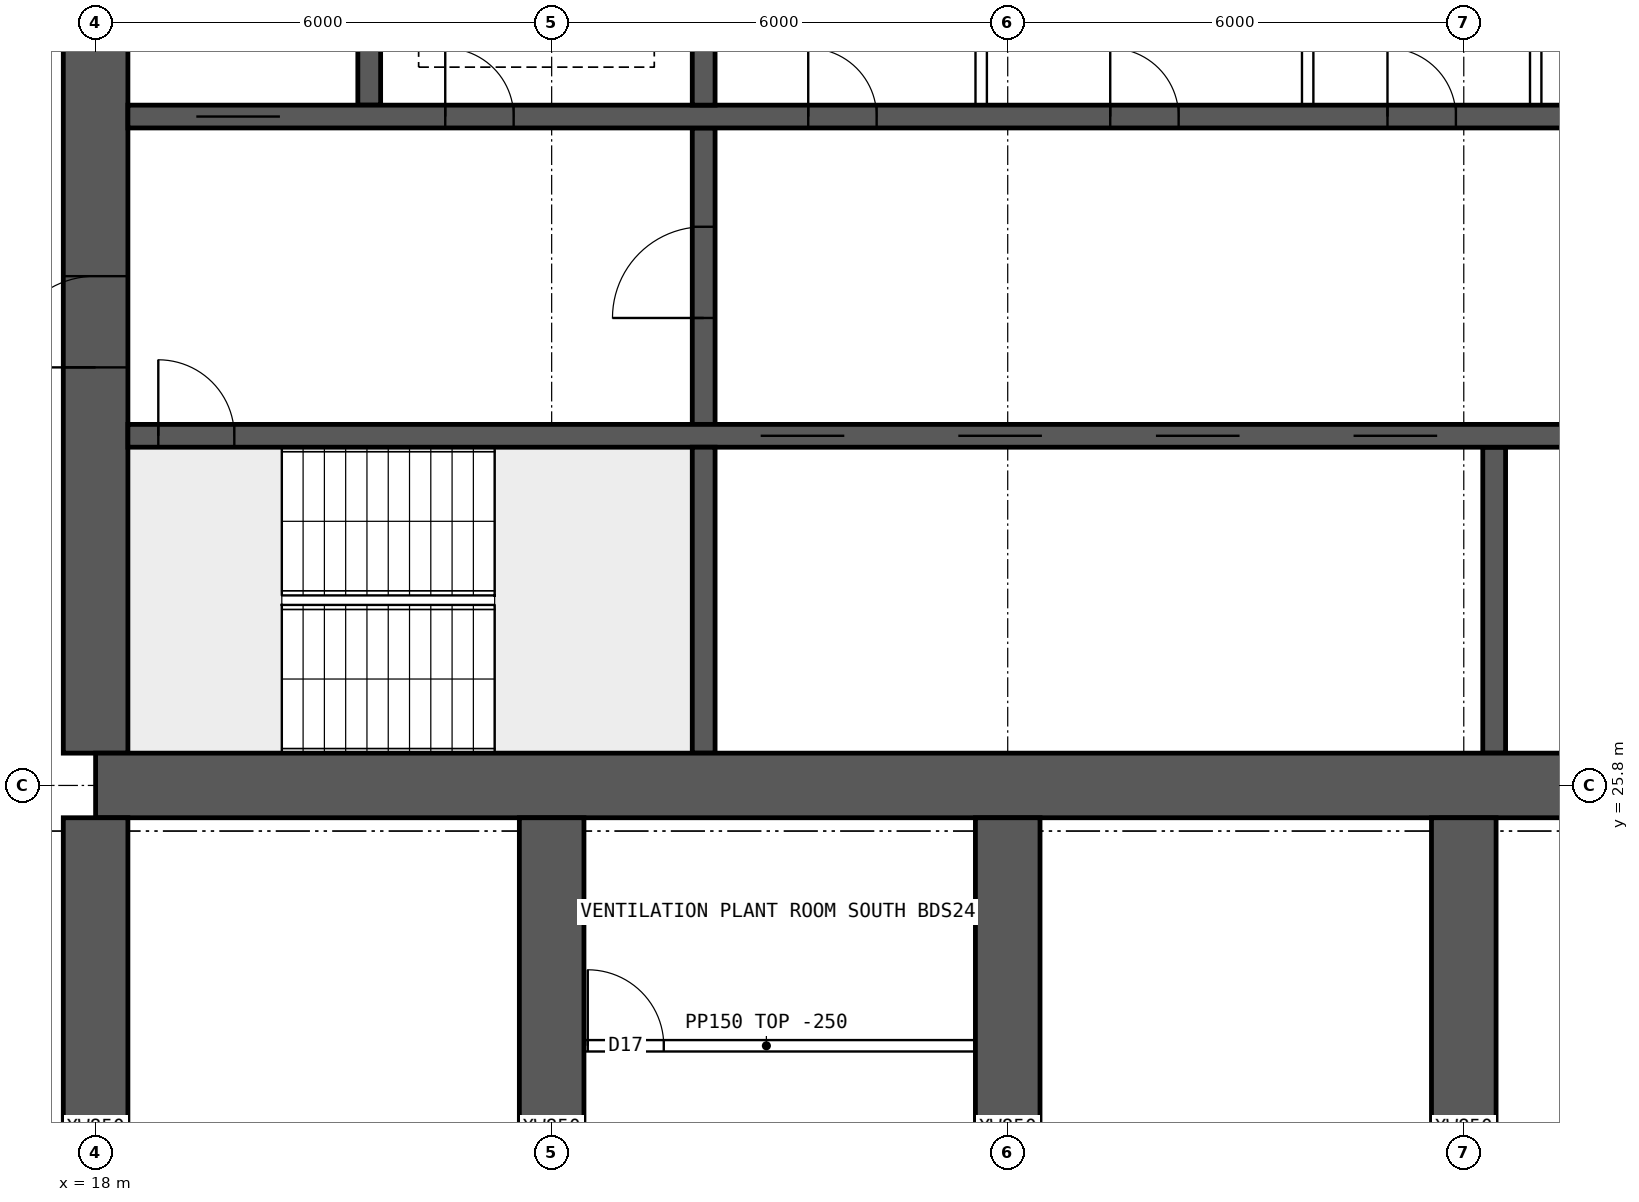
"""IFC4 building model, lengths in metres.
Left out: names, types, materials, properties, quantities, classifications, styles, units other than length and angle.
Written with IfcOpenShell. Run it as: python <this file> out.ifc"""

import sys

from ifc_helpers import new_model, si_unit, direction, frame, frame_2d, origin, place, context, subcontext, project, spatial, rectangle, extrude, element, fill, save


model = new_model("IFC4")
c1 = context("Model", 3, precision=1e-05, world=origin(), true_north=direction((0.0, 1.0)))
c2 = subcontext(c1, "Body", "Model", "MODEL_VIEW")
j1 = project(units=[si_unit("LENGTHUNIT", "METRE"), si_unit("PLANEANGLEUNIT", "RADIAN")], contexts=[c1])
p1 = place(None, origin())
s1 = spatial("IfcSite", under=j1, at=p1, CompositionType="ELEMENT")
p2 = place(p1, origin())
s2 = spatial("IfcBuilding", under=s1, at=p2, CompositionType="ELEMENT")
p3 = place(p2, frame((0.0, 0.0, 182.35)))
s3 = spatial("IfcBuildingStorey", under=s2, at=p3, CompositionType="ELEMENT", Elevation=182.35)
p4 = place(p3, frame((18.0, 25.8, 0.0), z_axis=(0.0, 0.0, 1.0), x_axis=(1.0, 0.0, 0.0)))
e1 = element("IfcWall", 1, at=p4, inside=s3, PredefinedType="SHEAR", context=c2, shape_type="SweptSolid", body=[
    extrude(rectangle(XDim=48.0, YDim=0.85, at=frame_2d((24.0, 0.0))), origin(), (0.0, 0.0, 1.0), 3.75),
])
p5 = place(p3, frame((18.0, 26.225, 0.0), z_axis=(0.0, 0.0, 1.0), x_axis=(0.0, 1.0, 0.0)))
e2 = element("IfcWall", 2, at=p5, inside=s3, PredefinedType="SHEAR", context=c2, shape_type="SweptSolid", body=[
    extrude(rectangle(XDim=11.55, YDim=0.85, at=frame_2d((5.775, 0.0))), origin(), (0.0, 0.0, 1.0), 3.75),
])
p6 = place(p5, frame((5.075, 0.0, 0.0)))
e3 = element("IfcOpeningElement", 3, at=p6, cuts=e2, PredefinedType="OPENING", context=c2, shape_type="SweptSolid", body=[
    extrude(rectangle(XDim=1.2, YDim=2.1, at=frame_2d((0.6, 1.05))), frame((0.0, 0.435, 0.0), z_axis=(0.0, -1.0, 0.0), x_axis=(1.0, 0.0, 0.0)), (0.0, 0.0, 1.0), 0.87),
])
p7 = place(p3, frame((18.425, 30.4, 0.0), z_axis=(0.0, 0.0, 1.0), x_axis=(1.0, 0.0, 0.0)))
e4 = element("IfcWall", 4, at=p7, inside=s3, PredefinedType="SHEAR", context=c2, shape_type="SweptSolid", body=[
    extrude(rectangle(XDim=47.15, YDim=0.3, at=frame_2d((23.575, 0.0))), origin(), (0.0, 0.0, 1.0), 3.75),
])
p8 = place(p7, frame((0.4, 0.0, 0.0)))
e5 = element("IfcOpeningElement", 5, at=p8, cuts=e4, PredefinedType="OPENING", context=c2, shape_type="SweptSolid", body=[
    extrude(rectangle(XDim=1.0, YDim=2.1, at=frame_2d((0.5, 1.05))), frame((0.0, 0.16, 0.0), z_axis=(0.0, -1.0, 0.0), x_axis=(1.0, 0.0, 0.0)), (0.0, 0.0, 1.0), 0.32),
])
p9 = place(p7, frame((45.75, 0.0, 0.0)))
e6 = element("IfcOpeningElement", 6, at=p9, cuts=e4, PredefinedType="OPENING", context=c2, shape_type="SweptSolid", body=[
    extrude(rectangle(XDim=1.0, YDim=2.1, at=frame_2d((0.5, 1.05))), frame((0.0, 0.16, 0.0), z_axis=(0.0, -1.0, 0.0), x_axis=(1.0, 0.0, 0.0)), (0.0, 0.0, 1.0), 0.32),
])
p10 = place(p7, frame((8.325, 0.0, 0.0)))
e7 = element("IfcOpeningElement", 7, at=p10, cuts=e4, PredefinedType="OPENING", context=c2, shape_type="SweptSolid", body=[
    extrude(rectangle(XDim=1.1, YDim=2.1, at=frame_2d((0.55, 1.05))), frame((0.0, 0.16, 0.0), z_axis=(0.0, -1.0, 0.0), x_axis=(1.0, 0.0, 0.0)), (0.0, 0.0, 1.0), 0.32),
])
p11 = place(p7, frame((10.925, 0.0, 0.0)))
e8 = element("IfcOpeningElement", 8, at=p11, cuts=e4, PredefinedType="OPENING", context=c2, shape_type="SweptSolid", body=[
    extrude(rectangle(XDim=1.1, YDim=2.1, at=frame_2d((0.55, 1.05))), frame((0.0, 0.16, 0.0), z_axis=(0.0, -1.0, 0.0), x_axis=(1.0, 0.0, 0.0)), (0.0, 0.0, 1.0), 0.32),
])
p12 = place(p7, frame((13.525, 0.0, 0.0)))
e9 = element("IfcOpeningElement", 9, at=p12, cuts=e4, PredefinedType="OPENING", context=c2, shape_type="SweptSolid", body=[
    extrude(rectangle(XDim=1.1, YDim=2.1, at=frame_2d((0.55, 1.05))), frame((0.0, 0.16, 0.0), z_axis=(0.0, -1.0, 0.0), x_axis=(1.0, 0.0, 0.0)), (0.0, 0.0, 1.0), 0.32),
])
p13 = place(p7, frame((16.125, 0.0, 0.0)))
e10 = element("IfcOpeningElement", 10, at=p13, cuts=e4, PredefinedType="OPENING", context=c2, shape_type="SweptSolid", body=[
    extrude(rectangle(XDim=1.1, YDim=2.1, at=frame_2d((0.55, 1.05))), frame((0.0, 0.16, 0.0), z_axis=(0.0, -1.0, 0.0), x_axis=(1.0, 0.0, 0.0)), (0.0, 0.0, 1.0), 0.32),
])
p14 = place(p7, frame((18.9, 0.0, 0.0)))
e11 = element("IfcOpeningElement", 11, at=p14, cuts=e4, PredefinedType="OPENING", context=c2, shape_type="SweptSolid", body=[
    extrude(rectangle(XDim=0.9, YDim=2.1, at=frame_2d((0.45, 1.05))), frame((0.0, 0.16, 0.0), z_axis=(0.0, -1.0, 0.0), x_axis=(1.0, 0.0, 0.0)), (0.0, 0.0, 1.0), 0.32),
])
p15 = place(p7, frame((30.192, 0.0, 0.0)))
e12 = element("IfcOpeningElement", 12, at=p15, cuts=e4, PredefinedType="OPENING", context=c2, shape_type="SweptSolid", body=[
    extrude(rectangle(XDim=1.1, YDim=2.1, at=frame_2d((0.55, 1.05))), frame((0.0, 0.16, 0.0), z_axis=(0.0, -1.0, 0.0), x_axis=(1.0, 0.0, 0.0)), (0.0, 0.0, 1.0), 0.32),
])
p16 = place(p7, frame((33.725, 0.0, 0.0)))
e13 = element("IfcOpeningElement", 13, at=p16, cuts=e4, PredefinedType="OPENING", context=c2, shape_type="SweptSolid", body=[
    extrude(rectangle(XDim=1.1, YDim=2.1, at=frame_2d((0.55, 1.05))), frame((0.0, 0.16, 0.0), z_axis=(0.0, -1.0, 0.0), x_axis=(1.0, 0.0, 0.0)), (0.0, 0.0, 1.0), 0.32),
])
p17 = place(p7, frame((37.258, 0.0, 0.0)))
e14 = element("IfcOpeningElement", 14, at=p17, cuts=e4, PredefinedType="OPENING", context=c2, shape_type="SweptSolid", body=[
    extrude(rectangle(XDim=1.1, YDim=2.1, at=frame_2d((0.55, 1.05))), frame((0.0, 0.16, 0.0), z_axis=(0.0, -1.0, 0.0), x_axis=(1.0, 0.0, 0.0)), (0.0, 0.0, 1.0), 0.32),
])
p18 = place(p3, frame((18.425, 34.6, 0.0), z_axis=(0.0, 0.0, 1.0), x_axis=(1.0, 0.0, 0.0)))
e15 = element("IfcWall", 15, at=p18, inside=s3, PredefinedType="SHEAR", context=c2, shape_type="SweptSolid", body=[
    extrude(rectangle(XDim=47.15, YDim=0.3, at=frame_2d((23.575, 0.0))), origin(), (0.0, 0.0, 1.0), 3.75),
])
p19 = place(p18, frame((0.9, 0.0, 0.0)))
e16 = element("IfcOpeningElement", 16, at=p19, cuts=e15, PredefinedType="OPENING", context=c2, shape_type="SweptSolid", body=[
    extrude(rectangle(XDim=1.1, YDim=2.1, at=frame_2d((0.55, 1.05))), frame((0.0, 0.16, 0.0), z_axis=(0.0, -1.0, 0.0), x_axis=(1.0, 0.0, 0.0)), (0.0, 0.0, 1.0), 0.32),
])
p20 = place(p18, frame((45.15, 0.0, 0.0)))
e17 = element("IfcOpeningElement", 17, at=p20, cuts=e15, PredefinedType="OPENING", context=c2, shape_type="SweptSolid", body=[
    extrude(rectangle(XDim=1.1, YDim=2.1, at=frame_2d((0.55, 1.05))), frame((0.0, 0.16, 0.0), z_axis=(0.0, -1.0, 0.0), x_axis=(1.0, 0.0, 0.0)), (0.0, 0.0, 1.0), 0.32),
])
p21 = place(p18, frame((4.175, 0.0, 0.0)))
e18 = element("IfcOpeningElement", 18, at=p21, cuts=e15, PredefinedType="OPENING", context=c2, shape_type="SweptSolid", body=[
    extrude(rectangle(XDim=0.9, YDim=2.1, at=frame_2d((0.45, 1.05))), frame((0.0, 0.16, 0.0), z_axis=(0.0, -1.0, 0.0), x_axis=(1.0, 0.0, 0.0)), (0.0, 0.0, 1.0), 0.32),
])
p22 = place(p18, frame((42.075, 0.0, 0.0)))
e19 = element("IfcOpeningElement", 19, at=p22, cuts=e15, PredefinedType="OPENING", context=c2, shape_type="SweptSolid", body=[
    extrude(rectangle(XDim=0.9, YDim=2.1, at=frame_2d((0.45, 1.05))), frame((0.0, 0.16, 0.0), z_axis=(0.0, -1.0, 0.0), x_axis=(1.0, 0.0, 0.0)), (0.0, 0.0, 1.0), 0.32),
])
p23 = place(p18, frame((8.95, 0.0, 0.0)))
e20 = element("IfcOpeningElement", 20, at=p23, cuts=e15, PredefinedType="OPENING", context=c2, shape_type="SweptSolid", body=[
    extrude(rectangle(XDim=0.9, YDim=2.1, at=frame_2d((0.45, 1.05))), frame((0.0, 0.16, 0.0), z_axis=(0.0, -1.0, 0.0), x_axis=(1.0, 0.0, 0.0)), (0.0, 0.0, 1.0), 0.32),
])
p24 = place(p18, frame((12.924, 0.0, 0.0)))
e21 = element("IfcOpeningElement", 21, at=p24, cuts=e15, PredefinedType="OPENING", context=c2, shape_type="SweptSolid", body=[
    extrude(rectangle(XDim=0.9, YDim=2.1, at=frame_2d((0.45, 1.05))), frame((0.0, 0.16, 0.0), z_axis=(0.0, -1.0, 0.0), x_axis=(1.0, 0.0, 0.0)), (0.0, 0.0, 1.0), 0.32),
])
p25 = place(p18, frame((16.571, 0.0, 0.0)))
e22 = element("IfcOpeningElement", 22, at=p25, cuts=e15, PredefinedType="OPENING", context=c2, shape_type="SweptSolid", body=[
    extrude(rectangle(XDim=0.9, YDim=2.1, at=frame_2d((0.45, 1.05))), frame((0.0, 0.16, 0.0), z_axis=(0.0, -1.0, 0.0), x_axis=(1.0, 0.0, 0.0)), (0.0, 0.0, 1.0), 0.32),
])
p26 = place(p18, frame((20.33, 0.0, 0.0)))
e23 = element("IfcOpeningElement", 23, at=p26, cuts=e15, PredefinedType="OPENING", context=c2, shape_type="SweptSolid", body=[
    extrude(rectangle(XDim=0.9, YDim=2.1, at=frame_2d((0.45, 1.05))), frame((0.0, 0.16, 0.0), z_axis=(0.0, -1.0, 0.0), x_axis=(1.0, 0.0, 0.0)), (0.0, 0.0, 1.0), 0.32),
])
p27 = place(p18, frame((24.736, 0.0, 0.0)))
e24 = element("IfcOpeningElement", 24, at=p27, cuts=e15, PredefinedType="OPENING", context=c2, shape_type="SweptSolid", body=[
    extrude(rectangle(XDim=0.9, YDim=2.1, at=frame_2d((0.45, 1.05))), frame((0.0, 0.16, 0.0), z_axis=(0.0, -1.0, 0.0), x_axis=(1.0, 0.0, 0.0)), (0.0, 0.0, 1.0), 0.32),
])
p28 = place(p18, frame((27.533, 0.0, 0.0)))
e25 = element("IfcOpeningElement", 25, at=p28, cuts=e15, PredefinedType="OPENING", context=c2, shape_type="SweptSolid", body=[
    extrude(rectangle(XDim=0.9, YDim=2.1, at=frame_2d((0.45, 1.05))), frame((0.0, 0.16, 0.0), z_axis=(0.0, -1.0, 0.0), x_axis=(1.0, 0.0, 0.0)), (0.0, 0.0, 1.0), 0.32),
])
p29 = place(p18, frame((33.654, 0.0, 0.0)))
e26 = element("IfcOpeningElement", 26, at=p29, cuts=e15, PredefinedType="OPENING", context=c2, shape_type="SweptSolid", body=[
    extrude(rectangle(XDim=0.9, YDim=2.1, at=frame_2d((0.45, 1.05))), frame((0.0, 0.16, 0.0), z_axis=(0.0, -1.0, 0.0), x_axis=(1.0, 0.0, 0.0)), (0.0, 0.0, 1.0), 0.32),
])
p30 = place(p3, frame((26.0, 26.225, 0.0), z_axis=(0.0, 0.0, 1.0), x_axis=(0.0, 1.0, 0.0)))
e27 = element("IfcWall", 27, at=p30, inside=s3, PredefinedType="SHEAR", context=c2, shape_type="SweptSolid", body=[
    extrude(rectangle(XDim=4.025, YDim=0.3, at=frame_2d((2.012, 0.0))), origin(), (0.0, 0.0, 1.0), 3.75),
])
p31 = place(p3, frame((26.0, 30.55, 0.0), z_axis=(0.0, 0.0, 1.0), x_axis=(0.0, 1.0, 0.0)))
e28 = element("IfcWall", 28, at=p31, inside=s3, PredefinedType="SHEAR", context=c2, shape_type="SweptSolid", body=[
    extrude(rectangle(XDim=3.9, YDim=0.3, at=frame_2d((1.95, 0.0))), origin(), (0.0, 0.0, 1.0), 3.75),
])
p32 = place(p31, frame((1.4, 0.0, 0.0)))
e29 = element("IfcOpeningElement", 29, at=p32, cuts=e28, PredefinedType="OPENING", context=c2, shape_type="SweptSolid", body=[
    extrude(rectangle(XDim=1.2, YDim=2.1, at=frame_2d((0.6, 1.05))), frame((0.0, 0.16, 0.0), z_axis=(0.0, -1.0, 0.0), x_axis=(1.0, 0.0, 0.0)), (0.0, 0.0, 1.0), 0.32),
])
for number, where, z_axis, x_axis in (
    (30, (21.6, 34.75, 0.0), (0.0, 0.0, 1.0), (0.0, 1.0, 0.0)),
    (31, (26.0, 34.75, 0.0), (0.0, 0.0, 1.0), (0.0, 1.0, 0.0)),
):
    element("IfcWall", number, at=place(p3, frame(where, z_axis=z_axis, x_axis=x_axis)), inside=s3, PredefinedType="SHEAR", context=c2, shape_type="SweptSolid", body=[
        extrude(rectangle(XDim=3.025, YDim=0.3, at=frame_2d((1.512, 0.0))), origin(), (0.0, 0.0, 1.0), 3.75),
    ])
p33 = place(p3, frame((36.4, 26.225, 0.0), z_axis=(0.0, 0.0, 1.0), x_axis=(0.0, 1.0, 0.0)))
e32 = element("IfcWall", 32, at=p33, inside=s3, PredefinedType="SHEAR", context=c2, shape_type="SweptSolid", body=[
    extrude(rectangle(XDim=4.025, YDim=0.3, at=frame_2d((2.012, 0.0))), origin(), (0.0, 0.0, 1.0), 3.75),
])
for number, where, z_axis, x_axis in (
    (33, (18.0, 17.2, 0.0), (0.0, 0.0, 1.0), (0.0, 1.0, 0.0)),
    (34, (24.0, 17.2, 0.0), (0.0, 0.0, 1.0), (0.0, 1.0, 0.0)),
    (35, (30.0, 17.2, 0.0), (0.0, 0.0, 1.0), (0.0, 1.0, 0.0)),
    (36, (36.0, 17.2, 0.0), (0.0, 0.0, 1.0), (0.0, 1.0, 0.0)),
):
    element("IfcWall", number, at=place(p3, frame(where, z_axis=z_axis, x_axis=x_axis)), inside=s3, PredefinedType="SHEAR", context=c2, shape_type="SweptSolid", body=[
        extrude(rectangle(XDim=8.175, YDim=0.85, at=frame_2d((4.087, 0.0))), origin(), (0.0, 0.0, 1.0), 3.75),
    ])
for number, where, z_axis, x_axis in (
    (37, (29.651, 34.75, 0.0), (0.0, 0.0, 1.0), (0.0, 1.0, 0.0)),
    (38, (33.946, 34.75, 0.0), (0.0, 0.0, 1.0), (0.0, 1.0, 0.0)),
    (39, (36.946, 34.75, 0.0), (0.0, 0.0, 1.0), (0.0, 1.0, 0.0)),
):
    element("IfcWall", number, at=place(p3, frame(where, z_axis=z_axis, x_axis=x_axis)), inside=s3, PredefinedType="SOLIDWALL", context=c2, shape_type="SweptSolid", body=[
        extrude(rectangle(XDim=3.025, YDim=0.15, at=frame_2d((1.512, 0.0))), origin(), (0.0, 0.0, 1.0), 3.5),
    ])
p34 = place(p3, frame((24.075, 22.375, 0.0), z_axis=(0.0, 0.0, 1.0), x_axis=(1.0, 0.0, 0.0)))
e40 = element("IfcWall", 40, at=p34, inside=s3, PredefinedType="PARTITIONING", context=c2, shape_type="SweptSolid", body=[
    extrude(rectangle(XDim=5.5, YDim=0.15, at=frame_2d((2.75, 0.0))), origin(), (0.0, 0.0, 1.0), 3.5),
])
p35 = place(p34, frame((0.4, 0.0, 0.0)))
e41 = element("IfcOpeningElement", 41, at=p35, cuts=e40, PredefinedType="OPENING", context=c2, shape_type="SweptSolid", body=[
    extrude(rectangle(XDim=1.0, YDim=2.1, at=frame_2d((0.5, 1.05))), frame((0.0, 0.085, 0.0), z_axis=(0.0, -1.0, 0.0), x_axis=(1.0, 0.0, 0.0)), (0.0, 0.0, 1.0), 0.17),
])
p36 = place(p6, origin())
e42 = element("IfcDoor", 42, at=p36, inside=s3, OperationType="SINGLE_SWING_LEFT", PredefinedType="DOOR", context=c2, shape_type="SweptSolid", body=[
    extrude(rectangle(XDim=1.2, YDim=2.1, at=frame_2d((0.6, 1.05))), frame((0.0, 0.025, 0.0), z_axis=(0.0, -1.0, 0.0), x_axis=(1.0, 0.0, 0.0)), (0.0, 0.0, 1.0), 0.05),
])
fill(e3, e42)
p37 = place(p8, origin())
e43 = element("IfcDoor", 43, at=p37, inside=s3, OperationType="SINGLE_SWING_LEFT", PredefinedType="DOOR", context=c2, shape_type="SweptSolid", body=[
    extrude(rectangle(XDim=1.0, YDim=2.1, at=frame_2d((0.5, 1.05))), frame((0.0, 0.025, 0.0), z_axis=(0.0, -1.0, 0.0), x_axis=(1.0, 0.0, 0.0)), (0.0, 0.0, 1.0), 0.05),
])
fill(e5, e43)
p38 = place(p19, origin())
e44 = element("IfcDoor", 44, at=p38, inside=s3, OperationType="DOUBLE_DOOR_SLIDING", PredefinedType="DOOR", context=c2, shape_type="SweptSolid", body=[
    extrude(rectangle(XDim=1.1, YDim=2.1, at=frame_2d((0.55, 1.05))), frame((0.0, 0.025, 0.0), z_axis=(0.0, -1.0, 0.0), x_axis=(1.0, 0.0, 0.0)), (0.0, 0.0, 1.0), 0.05),
])
fill(e16, e44)
p39 = place(p21, origin())
e45 = element("IfcDoor", 45, at=p39, inside=s3, OperationType="SINGLE_SWING_LEFT", PredefinedType="DOOR", context=c2, shape_type="SweptSolid", body=[
    extrude(rectangle(XDim=0.9, YDim=2.1, at=frame_2d((0.45, 1.05))), frame((0.0, 0.025, 0.0), z_axis=(0.0, -1.0, 0.0), x_axis=(1.0, 0.0, 0.0)), (0.0, 0.0, 1.0), 0.05),
])
fill(e18, e45)
p40 = place(p32, origin())
e46 = element("IfcDoor", 46, at=p40, inside=s3, OperationType="SINGLE_SWING_LEFT", PredefinedType="DOOR", context=c2, shape_type="SweptSolid", body=[
    extrude(rectangle(XDim=1.2, YDim=2.1, at=frame_2d((0.6, 1.05))), frame((0.0, 0.025, 0.0), z_axis=(0.0, -1.0, 0.0), x_axis=(1.0, 0.0, 0.0)), (0.0, 0.0, 1.0), 0.05),
])
fill(e29, e46)
p41 = place(p23, origin())
e47 = element("IfcDoor", 47, at=p41, inside=s3, OperationType="SINGLE_SWING_LEFT", PredefinedType="DOOR", context=c2, shape_type="SweptSolid", body=[
    extrude(rectangle(XDim=0.9, YDim=2.1, at=frame_2d((0.45, 1.05))), frame((0.0, 0.025, 0.0), z_axis=(0.0, -1.0, 0.0), x_axis=(1.0, 0.0, 0.0)), (0.0, 0.0, 1.0), 0.05),
])
fill(e20, e47)
p42 = place(p24, origin())
e48 = element("IfcDoor", 48, at=p42, inside=s3, OperationType="SINGLE_SWING_LEFT", PredefinedType="DOOR", context=c2, shape_type="SweptSolid", body=[
    extrude(rectangle(XDim=0.9, YDim=2.1, at=frame_2d((0.45, 1.05))), frame((0.0, 0.025, 0.0), z_axis=(0.0, -1.0, 0.0), x_axis=(1.0, 0.0, 0.0)), (0.0, 0.0, 1.0), 0.05),
])
fill(e21, e48)
p43 = place(p25, origin())
e49 = element("IfcDoor", 49, at=p43, inside=s3, OperationType="SINGLE_SWING_LEFT", PredefinedType="DOOR", context=c2, shape_type="SweptSolid", body=[
    extrude(rectangle(XDim=0.9, YDim=2.1, at=frame_2d((0.45, 1.05))), frame((0.0, 0.025, 0.0), z_axis=(0.0, -1.0, 0.0), x_axis=(1.0, 0.0, 0.0)), (0.0, 0.0, 1.0), 0.05),
])
fill(e22, e49)
p44 = place(p10, origin())
e50 = element("IfcDoor", 50, at=p44, inside=s3, OperationType="DOUBLE_DOOR_SLIDING", PredefinedType="DOOR", context=c2, shape_type="SweptSolid", body=[
    extrude(rectangle(XDim=1.1, YDim=2.1, at=frame_2d((0.55, 1.05))), frame((0.0, 0.025, 0.0), z_axis=(0.0, -1.0, 0.0), x_axis=(1.0, 0.0, 0.0)), (0.0, 0.0, 1.0), 0.05),
])
fill(e7, e50)
p45 = place(p11, origin())
e51 = element("IfcDoor", 51, at=p45, inside=s3, OperationType="DOUBLE_DOOR_SLIDING", PredefinedType="DOOR", context=c2, shape_type="SweptSolid", body=[
    extrude(rectangle(XDim=1.1, YDim=2.1, at=frame_2d((0.55, 1.05))), frame((0.0, 0.025, 0.0), z_axis=(0.0, -1.0, 0.0), x_axis=(1.0, 0.0, 0.0)), (0.0, 0.0, 1.0), 0.05),
])
fill(e8, e51)
p46 = place(p12, origin())
e52 = element("IfcDoor", 52, at=p46, inside=s3, OperationType="DOUBLE_DOOR_SLIDING", PredefinedType="DOOR", context=c2, shape_type="SweptSolid", body=[
    extrude(rectangle(XDim=1.1, YDim=2.1, at=frame_2d((0.55, 1.05))), frame((0.0, 0.025, 0.0), z_axis=(0.0, -1.0, 0.0), x_axis=(1.0, 0.0, 0.0)), (0.0, 0.0, 1.0), 0.05),
])
fill(e9, e52)
p47 = place(p13, origin())
e53 = element("IfcDoor", 53, at=p47, inside=s3, OperationType="DOUBLE_DOOR_SLIDING", PredefinedType="DOOR", context=c2, shape_type="SweptSolid", body=[
    extrude(rectangle(XDim=1.1, YDim=2.1, at=frame_2d((0.55, 1.05))), frame((0.0, 0.025, 0.0), z_axis=(0.0, -1.0, 0.0), x_axis=(1.0, 0.0, 0.0)), (0.0, 0.0, 1.0), 0.05),
])
fill(e10, e53)
p48 = place(p35, origin())
e54 = element("IfcDoor", 54, at=p48, inside=s3, OperationType="SINGLE_SWING_LEFT", PredefinedType="DOOR", context=c2, shape_type="SweptSolid", body=[
    extrude(rectangle(XDim=1.0, YDim=2.1, at=frame_2d((0.5, 1.05))), frame((0.0, 0.025, 0.0), z_axis=(0.0, -1.0, 0.0), x_axis=(1.0, 0.0, 0.0)), (0.0, 0.0, 1.0), 0.05),
])
fill(e41, e54)
save(model, sys.argv[1])
